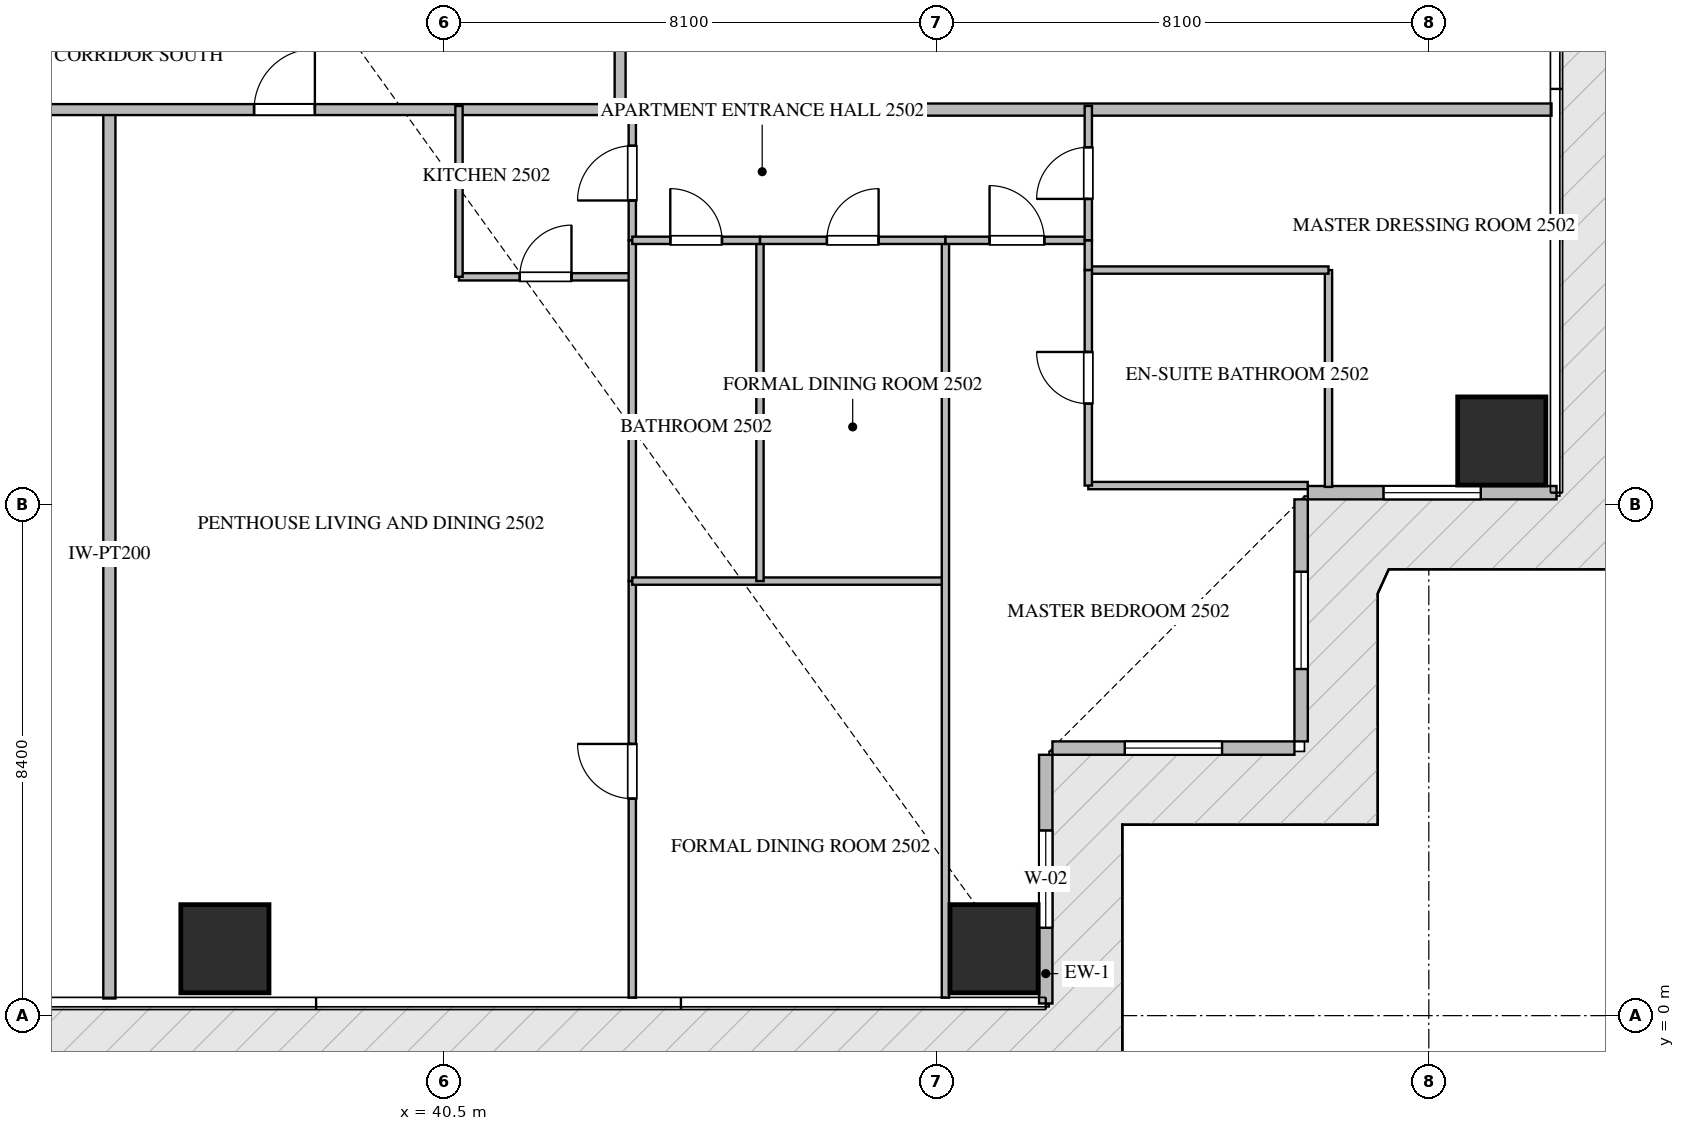
"""IFC4 building model, lengths in metres.
Left out: names, types, materials, properties, quantities, classifications, styles, units other than length and angle.
Written with IfcOpenShell. Run it as: python <this file> out.ifc"""

import sys

from ifc_helpers import new_model, si_unit, direction, frame, frame_2d, origin, origin_2d, place, context, subcontext, project, spatial, rectangle, extrude, source, transform, mapped, element, fill, save


model = new_model("IFC4")
c1 = context("Model", 3, precision=1e-05, world=origin(), true_north=direction((0.0, 1.0)))
c2 = subcontext(c1, "Body", "Model", "MODEL_VIEW")
j1 = project(units=[si_unit("LENGTHUNIT", "METRE"), si_unit("PLANEANGLEUNIT", "RADIAN")], contexts=[c1])
p1 = place(None, origin())
s1 = spatial("IfcSite", under=j1, at=p1, CompositionType="ELEMENT")
p2 = place(p1, origin())
s2 = spatial("IfcBuilding", under=s1, at=p2, CompositionType="ELEMENT")
p3 = place(p2, frame((0.0, 0.0, 101.7)))
s3 = spatial("IfcBuildingStorey", under=s2, at=p3, CompositionType="ELEMENT", Elevation=101.7)
m1 = source(origin(), c2, "Body", "SweptSolid", [
    extrude(rectangle(XDim=1.45, YDim=1.45, at=origin_2d()), origin(), (0.0, 0.0, 1.0), 3.75),
])
for number, where, z_axis, x_axis in (
    (1, (36.9, 1.1, -0.26), (0.0, 0.0, 1.0), (1.0, 0.0, 0.0)),
    (2, (49.55, 1.1, -0.26), (0.0, 0.0, 1.0), (1.0, 0.0, 0.0)),
    (3, (57.9, 9.45, -0.26), (0.0, 0.0, 1.0), (1.0, 0.0, 0.0)),
):
    element("IfcColumn", number, at=place(p3, frame(where, z_axis=z_axis, x_axis=x_axis)), inside=s3, PredefinedType="COLUMN", context=c2, shape_type="MappedRepresentation", body=[
        mapped(m1, transform((0.0, 0.0, 0.0), scale=1.0)),
    ])
p4 = place(p3, frame((50.4, 0.2, 0.0), z_axis=(0.0, 0.0, 1.0), x_axis=(0.0, 1.0, 0.0)))
e4 = element("IfcWall", 4, at=p4, inside=s3, PredefinedType="ELEMENTEDWALL", context=c2, shape_type="SweptSolid", body=[
    extrude(rectangle(XDim=4.09, YDim=0.22, at=frame_2d((2.045, 0.0))), origin(), (0.0, 0.0, 1.0), 3.475),
])
p5 = place(p4, frame((1.245, 0.0, 0.65)))
e5 = element("IfcOpeningElement", 5, at=p5, cuts=e4, PredefinedType="OPENING", context=c2, shape_type="SweptSolid", body=[
    extrude(rectangle(XDim=1.6, YDim=2.1, at=frame_2d((0.8, 1.05))), frame((0.0, 0.12, 0.0), z_axis=(0.0, -1.0, 0.0), x_axis=(1.0, 0.0, 0.0)), (0.0, 0.0, 1.0), 0.24),
])
p6 = place(p3, frame((50.51, 4.4, 0.0), z_axis=(0.0, 0.0, 1.0), x_axis=(1.0, 0.0, 0.0)))
e6 = element("IfcWall", 6, at=p6, inside=s3, PredefinedType="ELEMENTEDWALL", context=c2, shape_type="SweptSolid", body=[
    extrude(rectangle(XDim=3.98, YDim=0.22, at=frame_2d((1.99, 0.0))), origin(), (0.0, 0.0, 1.0), 3.475),
])
p7 = place(p6, frame((1.19, 0.0, 0.65)))
e7 = element("IfcOpeningElement", 7, at=p7, cuts=e6, PredefinedType="OPENING", context=c2, shape_type="SweptSolid", body=[
    extrude(rectangle(XDim=1.6, YDim=2.1, at=frame_2d((0.8, 1.05))), frame((0.0, 0.12, 0.0), z_axis=(0.0, -1.0, 0.0), x_axis=(1.0, 0.0, 0.0)), (0.0, 0.0, 1.0), 0.24),
])
p8 = place(p3, frame((54.6, 4.51, 0.0), z_axis=(0.0, 0.0, 1.0), x_axis=(0.0, 1.0, 0.0)))
e8 = element("IfcWall", 8, at=p8, inside=s3, PredefinedType="ELEMENTEDWALL", context=c2, shape_type="SweptSolid", body=[
    extrude(rectangle(XDim=3.98, YDim=0.22, at=frame_2d((1.99, 0.0))), origin(), (0.0, 0.0, 1.0), 3.475),
])
p9 = place(p8, frame((1.19, 0.0, 0.65)))
e9 = element("IfcOpeningElement", 9, at=p9, cuts=e8, PredefinedType="OPENING", context=c2, shape_type="SweptSolid", body=[
    extrude(rectangle(XDim=1.6, YDim=2.1, at=frame_2d((0.8, 1.05))), frame((0.0, 0.12, 0.0), z_axis=(0.0, -1.0, 0.0), x_axis=(1.0, 0.0, 0.0)), (0.0, 0.0, 1.0), 0.24),
])
p10 = place(p3, frame((54.71, 8.6, 0.0), z_axis=(0.0, 0.0, 1.0), x_axis=(1.0, 0.0, 0.0)))
e10 = element("IfcWall", 10, at=p10, inside=s3, PredefinedType="ELEMENTEDWALL", context=c2, shape_type="SweptSolid", body=[
    extrude(rectangle(XDim=4.09, YDim=0.22, at=frame_2d((2.045, 0.0))), origin(), (0.0, 0.0, 1.0), 3.475),
])
p11 = place(p10, frame((1.245, 0.0, 0.65)))
e11 = element("IfcOpeningElement", 11, at=p11, cuts=e10, PredefinedType="OPENING", context=c2, shape_type="SweptSolid", body=[
    extrude(rectangle(XDim=1.6, YDim=2.1, at=frame_2d((0.8, 1.05))), frame((0.0, 0.12, 0.0), z_axis=(0.0, -1.0, 0.0), x_axis=(1.0, 0.0, 0.0)), (0.0, 0.0, 1.0), 0.24),
])
p12 = place(p3, frame((35.0, 0.282, 0.0), z_axis=(0.0, 0.0, 1.0), x_axis=(0.0, 1.0, 0.0)))
e12 = element("IfcWall", 12, at=p12, inside=s3, PredefinedType="PARTITIONING", context=c2, shape_type="SweptSolid", body=[
    extrude(rectangle(XDim=14.618, YDim=0.2, at=frame_2d((7.309, 0.0))), origin(), (0.0, 0.0, 1.0), 3.49),
])
p13 = place(p3, frame((43.4, 14.9, 0.0), z_axis=(0.0, 0.0, 1.0), x_axis=(1.0, 0.0, 0.0)))
e13 = element("IfcWall", 13, at=p13, inside=s3, PredefinedType="PARTITIONING", context=c2, shape_type="SweptSolid", body=[
    extrude(rectangle(XDim=15.318, YDim=0.2, at=frame_2d((7.659, 0.0))), origin(), (0.0, 0.0, 1.0), 3.49),
])
p14 = place(p3, frame((21.402, 14.9, 0.0), z_axis=(0.0, 0.0, 1.0), x_axis=(1.0, 0.0, 0.0)))
e14 = element("IfcWall", 14, at=p14, inside=s3, PredefinedType="PARTITIONING", context=c2, shape_type="SweptSolid", body=[
    extrude(rectangle(XDim=21.996, YDim=0.18, at=frame_2d((10.998, 0.0))), origin(), (0.0, 0.0, 1.0), 3.49),
])
p15 = place(p14, frame((10.351, 0.0, 0.0)))
e15 = element("IfcOpeningElement", 15, at=p15, cuts=e14, PredefinedType="OPENING", context=c2, shape_type="SweptSolid", body=[
    extrude(rectangle(XDim=1.0, YDim=2.15, at=frame_2d((0.5, 1.075))), frame((0.0, 0.1, 0.0), z_axis=(0.0, -1.0, 0.0), x_axis=(1.0, 0.0, 0.0)), (0.0, 0.0, 1.0), 0.2),
])
p16 = place(p14, frame((15.978, 0.0, 0.0)))
e16 = element("IfcOpeningElement", 16, at=p16, cuts=e14, PredefinedType="OPENING", context=c2, shape_type="SweptSolid", body=[
    extrude(rectangle(XDim=1.0, YDim=2.15, at=frame_2d((0.5, 1.075))), frame((0.0, 0.1, 0.0), z_axis=(0.0, -1.0, 0.0), x_axis=(1.0, 0.0, 0.0)), (0.0, 0.0, 1.0), 0.2),
])
p17 = place(p3, frame((43.4, 14.9, 0.0), z_axis=(0.0, 0.0, 1.0), x_axis=(0.0, 1.0, 0.0)))
e17 = element("IfcWall", 17, at=p17, inside=s3, PredefinedType="PARTITIONING", context=c2, shape_type="SweptSolid", body=[
    extrude(rectangle(XDim=20.6, YDim=0.18, at=frame_2d((10.3, 0.0))), origin(), (0.0, 0.0, 1.0), 3.49),
])
p18 = place(p17, frame((3.43, 0.0, 0.0)))
e18 = element("IfcOpeningElement", 18, at=p18, cuts=e17, PredefinedType="OPENING", context=c2, shape_type="SweptSolid", body=[
    extrude(rectangle(XDim=1.0, YDim=2.15, at=frame_2d((0.5, 1.075))), frame((0.0, 0.1, 0.0), z_axis=(0.0, -1.0, 0.0), x_axis=(1.0, 0.0, 0.0)), (0.0, 0.0, 1.0), 0.2),
])
p19 = place(p17, frame((17.64, 0.0, 0.0)))
e19 = element("IfcOpeningElement", 19, at=p19, cuts=e17, PredefinedType="OPENING", context=c2, shape_type="SweptSolid", body=[
    extrude(rectangle(XDim=1.0, YDim=2.15, at=frame_2d((0.5, 1.075))), frame((0.0, 0.1, 0.0), z_axis=(0.0, -1.0, 0.0), x_axis=(1.0, 0.0, 0.0)), (0.0, 0.0, 1.0), 0.2),
])
p20 = place(p3, frame((40.75, 12.15, 0.0), z_axis=(0.0, 0.0, 1.0), x_axis=(1.0, 0.0, 0.0)))
e20 = element("IfcWall", 20, at=p20, inside=s3, PredefinedType="PARTITIONING", context=c2, shape_type="SweptSolid", body=[
    extrude(rectangle(XDim=2.85, YDim=0.12, at=frame_2d((1.425, 0.0))), origin(), (0.0, 0.0, 1.0), 3.49),
])
p21 = place(p20, frame((1.0, 0.0, 0.0)))
e21 = element("IfcOpeningElement", 21, at=p21, cuts=e20, PredefinedType="OPENING", context=c2, shape_type="SweptSolid", body=[
    extrude(rectangle(XDim=0.85, YDim=2.1, at=frame_2d((0.425, 1.05))), frame((0.0, 0.07, 0.0), z_axis=(0.0, -1.0, 0.0), x_axis=(1.0, 0.0, 0.0)), (0.0, 0.0, 1.0), 0.14),
])
p22 = place(p3, frame((40.75, 12.15, 0.0), z_axis=(0.0, 0.0, 1.0), x_axis=(0.0, 1.0, 0.0)))
e22 = element("IfcWall", 22, at=p22, inside=s3, PredefinedType="PARTITIONING", context=c2, shape_type="SweptSolid", body=[
    extrude(rectangle(XDim=2.81, YDim=0.12, at=frame_2d((1.405, 0.0))), origin(), (0.0, 0.0, 1.0), 3.49),
])
p23 = place(p3, frame((43.6, 12.75, 0.0), z_axis=(0.0, 0.0, 1.0), x_axis=(0.0, 1.0, 0.0)))
e23 = element("IfcWall", 23, at=p23, inside=s3, PredefinedType="PARTITIONING", context=c2, shape_type="SweptSolid", body=[
    extrude(rectangle(XDim=2.21, YDim=0.12, at=frame_2d((1.105, 0.0))), origin(), (0.0, 0.0, 1.0), 3.49),
])
p24 = place(p23, frame((0.655, 0.0, 0.0)))
e24 = element("IfcOpeningElement", 24, at=p24, cuts=e23, PredefinedType="OPENING", context=c2, shape_type="SweptSolid", body=[
    extrude(rectangle(XDim=0.9, YDim=2.1, at=frame_2d((0.45, 1.05))), frame((0.0, 0.07, 0.0), z_axis=(0.0, -1.0, 0.0), x_axis=(1.0, 0.0, 0.0)), (0.0, 0.0, 1.0), 0.14),
])
p25 = place(p3, frame((43.6, 0.295, 0.0), z_axis=(0.0, 0.0, 1.0), x_axis=(0.0, 1.0, 0.0)))
e25 = element("IfcWall", 25, at=p25, inside=s3, PredefinedType="PARTITIONING", context=c2, shape_type="SweptSolid", body=[
    extrude(rectangle(XDim=6.851, YDim=0.12, at=frame_2d((3.426, 0.0))), origin(), (0.0, 0.0, 1.0), 3.49),
])
p26 = place(p25, frame((3.273, 0.0, 0.0)))
e26 = element("IfcOpeningElement", 26, at=p26, cuts=e25, PredefinedType="OPENING", context=c2, shape_type="SweptSolid", body=[
    extrude(rectangle(XDim=0.9, YDim=2.1, at=frame_2d((0.45, 1.05))), frame((0.0, 0.07, 0.0), z_axis=(0.0, -1.0, 0.0), x_axis=(1.0, 0.0, 0.0)), (0.0, 0.0, 1.0), 0.14),
])
p27 = place(p3, frame((43.6, 7.148, 0.0), z_axis=(0.0, 0.0, 1.0), x_axis=(0.0, 1.0, 0.0)))
e27 = element("IfcWall", 27, at=p27, inside=s3, PredefinedType="PARTITIONING", context=c2, shape_type="SweptSolid", body=[
    extrude(rectangle(XDim=5.6, YDim=0.12, at=frame_2d((2.8, 0.0))), origin(), (0.0, 0.0, 1.0), 3.49),
])
p28 = place(p3, frame((43.6, 7.146, 0.0), z_axis=(0.0, 0.0, 1.0), x_axis=(1.0, 0.0, 0.0)))
e28 = element("IfcWall", 28, at=p28, inside=s3, PredefinedType="PARTITIONING", context=c2, shape_type="SweptSolid", body=[
    extrude(rectangle(XDim=5.15, YDim=0.12, at=frame_2d((2.575, 0.0))), origin(), (0.0, 0.0, 1.0), 3.49),
])
p29 = place(p3, frame((48.75, 0.295, 0.0), z_axis=(0.0, 0.0, 1.0), x_axis=(0.0, 1.0, 0.0)))
e29 = element("IfcWall", 29, at=p29, inside=s3, PredefinedType="PARTITIONING", context=c2, shape_type="SweptSolid", body=[
    extrude(rectangle(XDim=12.455, YDim=0.12, at=frame_2d((6.228, 0.0))), origin(), (0.0, 0.0, 1.0), 3.49),
])
p30 = place(p3, frame((45.7, 7.146, 0.0), z_axis=(0.0, 0.0, 1.0), x_axis=(0.0, 1.0, 0.0)))
e30 = element("IfcWall", 30, at=p30, inside=s3, PredefinedType="PARTITIONING", context=c2, shape_type="SweptSolid", body=[
    extrude(rectangle(XDim=5.604, YDim=0.12, at=frame_2d((2.802, 0.0))), origin(), (0.0, 0.0, 1.0), 3.49),
])
p31 = place(p3, frame((43.6, 12.75, 0.0), z_axis=(0.0, 0.0, 1.0), x_axis=(1.0, 0.0, 0.0)))
e31 = element("IfcWall", 31, at=p31, inside=s3, PredefinedType="PARTITIONING", context=c2, shape_type="SweptSolid", body=[
    extrude(rectangle(XDim=2.1, YDim=0.12, at=frame_2d((1.05, 0.0))), origin(), (0.0, 0.0, 1.0), 3.49),
])
p32 = place(p31, frame((0.625, 0.0, 0.0)))
e32 = element("IfcOpeningElement", 32, at=p32, cuts=e31, PredefinedType="OPENING", context=c2, shape_type="SweptSolid", body=[
    extrude(rectangle(XDim=0.85, YDim=2.1, at=frame_2d((0.425, 1.05))), frame((0.0, 0.07, 0.0), z_axis=(0.0, -1.0, 0.0), x_axis=(1.0, 0.0, 0.0)), (0.0, 0.0, 1.0), 0.14),
])
p33 = place(p3, frame((45.702, 12.75, 0.0), z_axis=(0.0, 0.0, 1.0), x_axis=(1.0, 0.0, 0.0)))
e33 = element("IfcWall", 33, at=p33, inside=s3, PredefinedType="PARTITIONING", context=c2, shape_type="SweptSolid", body=[
    extrude(rectangle(XDim=3.048, YDim=0.12, at=frame_2d((1.524, 0.0))), origin(), (0.0, 0.0, 1.0), 3.49),
])
p34 = place(p33, frame((1.099, 0.0, 0.0)))
e34 = element("IfcOpeningElement", 34, at=p34, cuts=e33, PredefinedType="OPENING", context=c2, shape_type="SweptSolid", body=[
    extrude(rectangle(XDim=0.85, YDim=2.1, at=frame_2d((0.425, 1.05))), frame((0.0, 0.07, 0.0), z_axis=(0.0, -1.0, 0.0), x_axis=(1.0, 0.0, 0.0)), (0.0, 0.0, 1.0), 0.14),
])
p35 = place(p3, frame((48.752, 12.75, 0.0), z_axis=(0.0, 0.0, 1.0), x_axis=(1.0, 0.0, 0.0)))
e35 = element("IfcWall", 35, at=p35, inside=s3, PredefinedType="PARTITIONING", context=c2, shape_type="SweptSolid", body=[
    extrude(rectangle(XDim=2.348, YDim=0.12, at=frame_2d((1.174, 0.0))), origin(), (0.0, 0.0, 1.0), 3.49),
])
p36 = place(p35, frame((0.724, 0.0, 0.0)))
e36 = element("IfcOpeningElement", 36, at=p36, cuts=e35, PredefinedType="OPENING", context=c2, shape_type="SweptSolid", body=[
    extrude(rectangle(XDim=0.9, YDim=2.1, at=frame_2d((0.45, 1.05))), frame((0.0, 0.07, 0.0), z_axis=(0.0, -1.0, 0.0), x_axis=(1.0, 0.0, 0.0)), (0.0, 0.0, 1.0), 0.14),
])
p37 = place(p3, frame((51.1, 8.717, 0.0), z_axis=(0.0, 0.0, 1.0), x_axis=(1.0, 0.0, 0.0)))
e37 = element("IfcWall", 37, at=p37, inside=s3, PredefinedType="PARTITIONING", context=c2, shape_type="SweptSolid", body=[
    extrude(rectangle(XDim=3.608, YDim=0.12, at=frame_2d((1.804, 0.0))), origin(), (0.0, 0.0, 1.0), 3.49),
])
p38 = place(p3, frame((55.05, 8.695, 0.0), z_axis=(0.0, 0.0, 1.0), x_axis=(0.0, 1.0, 0.0)))
e38 = element("IfcWall", 38, at=p38, inside=s3, PredefinedType="PARTITIONING", context=c2, shape_type="SweptSolid", body=[
    extrude(rectangle(XDim=3.566, YDim=0.12, at=frame_2d((1.783, 0.0))), origin(), (0.0, 0.0, 1.0), 3.49),
])
p39 = place(p3, frame((51.1, 12.261, 0.0), z_axis=(0.0, 0.0, 1.0), x_axis=(1.0, 0.0, 0.0)))
e39 = element("IfcWall", 39, at=p39, inside=s3, PredefinedType="PARTITIONING", context=c2, shape_type="SweptSolid", body=[
    extrude(rectangle(XDim=3.95, YDim=0.12, at=frame_2d((1.975, 0.0))), origin(), (0.0, 0.0, 1.0), 3.49),
])
p40 = place(p3, frame((51.1, 8.717, 0.0), z_axis=(0.0, 0.0, 1.0), x_axis=(0.0, 1.0, 0.0)))
e40 = element("IfcWall", 40, at=p40, inside=s3, PredefinedType="PARTITIONING", context=c2, shape_type="SweptSolid", body=[
    extrude(rectangle(XDim=3.544, YDim=0.12, at=frame_2d((1.772, 0.0))), origin(), (0.0, 0.0, 1.0), 3.49),
])
p41 = place(p40, frame((1.347, 0.0, 0.0)))
e41 = element("IfcOpeningElement", 41, at=p41, cuts=e40, PredefinedType="OPENING", context=c2, shape_type="SweptSolid", body=[
    extrude(rectangle(XDim=0.85, YDim=2.1, at=frame_2d((0.425, 1.05))), frame((0.0, 0.07, 0.0), z_axis=(0.0, -1.0, 0.0), x_axis=(1.0, 0.0, 0.0)), (0.0, 0.0, 1.0), 0.14),
])
p42 = place(p3, frame((51.1, 12.263, 0.0), z_axis=(0.0, 0.0, 1.0), x_axis=(0.0, 1.0, 0.0)))
e42 = element("IfcWall", 42, at=p42, inside=s3, PredefinedType="PARTITIONING", context=c2, shape_type="SweptSolid", body=[
    extrude(rectangle(XDim=0.487, YDim=0.12, at=frame_2d((0.244, 0.0))), origin(), (0.0, 0.0, 1.0), 3.49),
])
p43 = place(p3, frame((51.1, 12.752, 0.0), z_axis=(0.0, 0.0, 1.0), x_axis=(0.0, 1.0, 0.0)))
e43 = element("IfcWall", 43, at=p43, inside=s3, PredefinedType="PARTITIONING", context=c2, shape_type="SweptSolid", body=[
    extrude(rectangle(XDim=2.208, YDim=0.12, at=frame_2d((1.104, 0.0))), origin(), (0.0, 0.0, 1.0), 3.49),
])
p44 = place(p43, frame((0.679, 0.0, 0.0)))
e44 = element("IfcOpeningElement", 44, at=p44, cuts=e43, PredefinedType="OPENING", context=c2, shape_type="SweptSolid", body=[
    extrude(rectangle(XDim=0.85, YDim=2.1, at=frame_2d((0.425, 1.05))), frame((0.0, 0.07, 0.0), z_axis=(0.0, -1.0, 0.0), x_axis=(1.0, 0.0, 0.0)), (0.0, 0.0, 1.0), 0.14),
])
m2 = source(origin(), c2, "Body", "SweptSolid", [
    extrude(rectangle(XDim=1.6, YDim=2.1, at=frame_2d((0.8, 1.05))), frame((0.0, 0.03, 0.0), z_axis=(0.0, -1.0, 0.0), x_axis=(1.0, 0.0, 0.0)), (0.0, 0.0, 1.0), 0.06),
])
p45 = place(p5, origin())
e45 = element("IfcWindow", 45, at=p45, inside=s3, PartitioningType="SINGLE_PANEL", PredefinedType="WINDOW", context=c2, shape_type="MappedRepresentation", body=[
    mapped(m2, transform((0.0, 0.0, 0.0), scale=1.0)),
])
fill(e5, e45)
p46 = place(p7, origin())
e46 = element("IfcWindow", 46, at=p46, inside=s3, PartitioningType="SINGLE_PANEL", PredefinedType="WINDOW", context=c2, shape_type="MappedRepresentation", body=[
    mapped(m2, transform((0.0, 0.0, 0.0), scale=1.0)),
])
fill(e7, e46)
p47 = place(p9, origin())
e47 = element("IfcWindow", 47, at=p47, inside=s3, PartitioningType="SINGLE_PANEL", PredefinedType="WINDOW", context=c2, shape_type="MappedRepresentation", body=[
    mapped(m2, transform((0.0, 0.0, 0.0), scale=1.0)),
])
fill(e9, e47)
p48 = place(p11, origin())
e48 = element("IfcWindow", 48, at=p48, inside=s3, PartitioningType="SINGLE_PANEL", PredefinedType="WINDOW", context=c2, shape_type="MappedRepresentation", body=[
    mapped(m2, transform((0.0, 0.0, 0.0), scale=1.0)),
])
fill(e11, e48)
m3 = source(origin(), c2, "Body", "SweptSolid", [
    extrude(rectangle(XDim=1.0, YDim=2.15, at=frame_2d((0.5, 1.075))), frame((0.0, 0.025, 0.0), z_axis=(0.0, -1.0, 0.0), x_axis=(1.0, 0.0, 0.0)), (0.0, 0.0, 1.0), 0.05),
])
p49 = place(p16, origin())
e49 = element("IfcDoor", 49, at=p49, inside=s3, OperationType="SINGLE_SWING_RIGHT", PredefinedType="DOOR", context=c2, shape_type="MappedRepresentation", body=[
    mapped(m3, transform((0.0, 0.0, 0.0), scale=1.0)),
])
fill(e16, e49)
m4 = source(origin(), c2, "Body", "SweptSolid", [
    extrude(rectangle(XDim=0.85, YDim=2.1, at=frame_2d((0.425, 1.05))), frame((0.0, 0.025, 0.0), z_axis=(0.0, -1.0, 0.0), x_axis=(1.0, 0.0, 0.0)), (0.0, 0.0, 1.0), 0.05),
])
p50 = place(p21, origin())
e50 = element("IfcDoor", 50, at=p50, inside=s3, OperationType="SINGLE_SWING_RIGHT", PredefinedType="DOOR", context=c2, shape_type="MappedRepresentation", body=[
    mapped(m4, transform((0.0, 0.0, 0.0), scale=1.0)),
])
fill(e21, e50)
m5 = source(origin(), c2, "Body", "SweptSolid", [
    extrude(rectangle(XDim=0.9, YDim=2.1, at=frame_2d((0.45, 1.05))), frame((0.0, 0.025, 0.0), z_axis=(0.0, -1.0, 0.0), x_axis=(1.0, 0.0, 0.0)), (0.0, 0.0, 1.0), 0.05),
])
p51 = place(p24, origin())
e51 = element("IfcDoor", 51, at=p51, inside=s3, OperationType="SINGLE_SWING_LEFT", PredefinedType="DOOR", context=c2, shape_type="MappedRepresentation", body=[
    mapped(m5, transform((0.0, 0.0, 0.0), scale=1.0)),
])
fill(e24, e51)
p52 = place(p26, origin())
e52 = element("IfcDoor", 52, at=p52, inside=s3, OperationType="SINGLE_SWING_RIGHT", PredefinedType="DOOR", context=c2, shape_type="MappedRepresentation", body=[
    mapped(m5, transform((0.0, 0.0, 0.0), scale=1.0)),
])
fill(e26, e52)
p53 = place(p32, origin())
e53 = element("IfcDoor", 53, at=p53, inside=s3, OperationType="SINGLE_SWING_LEFT", PredefinedType="DOOR", context=c2, shape_type="MappedRepresentation", body=[
    mapped(m4, transform((0.0, 0.0, 0.0), scale=1.0)),
])
fill(e32, e53)
p54 = place(p34, origin())
e54 = element("IfcDoor", 54, at=p54, inside=s3, OperationType="SINGLE_SWING_RIGHT", PredefinedType="DOOR", context=c2, shape_type="MappedRepresentation", body=[
    mapped(m4, transform((0.0, 0.0, 0.0), scale=1.0)),
])
fill(e34, e54)
p55 = place(p36, origin())
e55 = element("IfcDoor", 55, at=p55, inside=s3, OperationType="SINGLE_SWING_LEFT", PredefinedType="DOOR", context=c2, shape_type="MappedRepresentation", body=[
    mapped(m5, transform((0.0, 0.0, 0.0), scale=1.0)),
])
fill(e36, e55)
p56 = place(p41, origin())
e56 = element("IfcDoor", 56, at=p56, inside=s3, OperationType="SINGLE_SWING_RIGHT", PredefinedType="DOOR", context=c2, shape_type="MappedRepresentation", body=[
    mapped(m4, transform((0.0, 0.0, 0.0), scale=1.0)),
])
fill(e41, e56)
p57 = place(p44, origin())
e57 = element("IfcDoor", 57, at=p57, inside=s3, OperationType="SINGLE_SWING_LEFT", PredefinedType="DOOR", context=c2, shape_type="MappedRepresentation", body=[
    mapped(m4, transform((0.0, 0.0, 0.0), scale=1.0)),
])
fill(e44, e57)
save(model, sys.argv[1])
